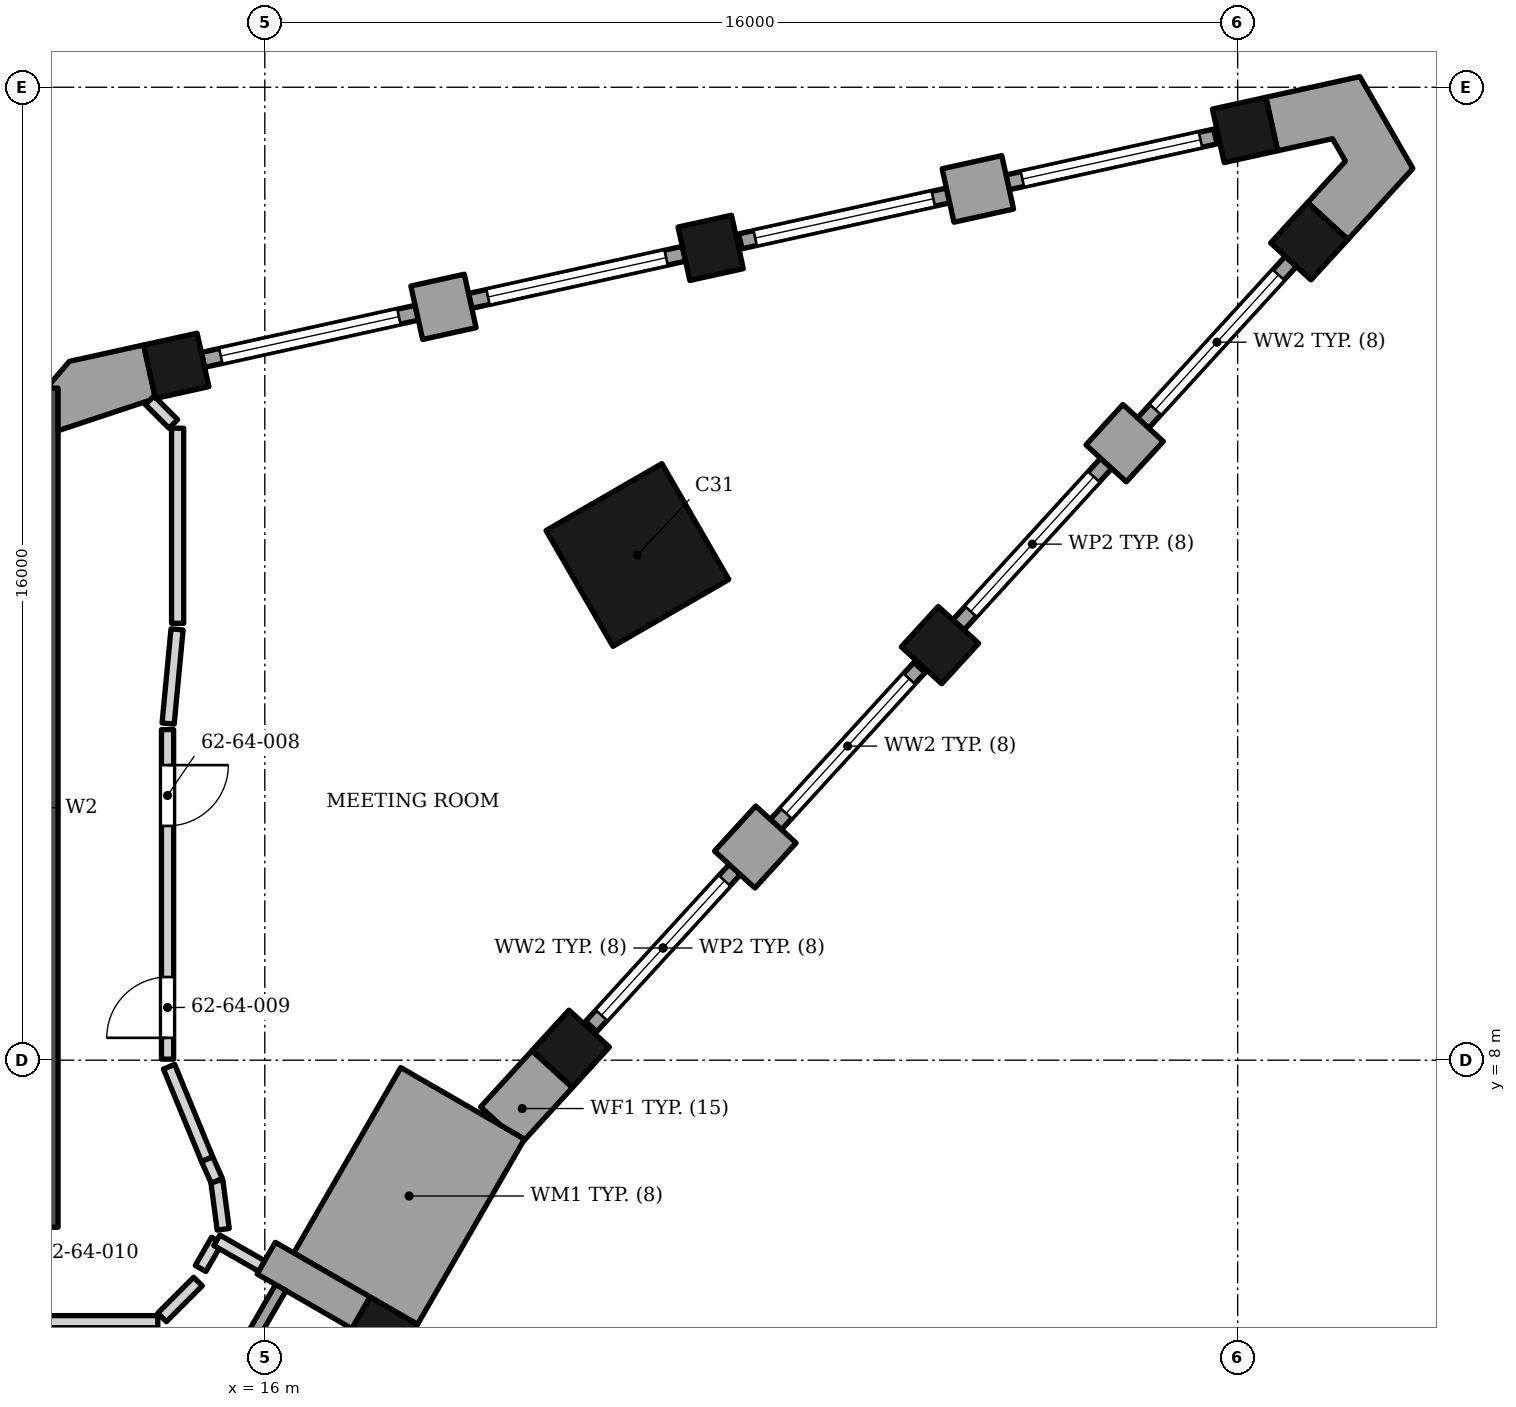
"""IFC4 building model, lengths in metres.
Left out: names, types, materials, properties, quantities, classifications, styles, units other than length and angle.
Written with IfcOpenShell. Run it as: python <this file> out.ifc"""

import sys

from ifc_helpers import new_model, si_unit, direction, frame, frame_2d, origin, origin_2d, place, context, subcontext, project, spatial, polyline, rectangle, outline, extrude, element, fill, save


model = new_model("IFC4")
c1 = context("Model", 3, precision=1e-05, world=origin(), true_north=direction((0.0, 1.0)))
c2 = subcontext(c1, "Body", "Model", "MODEL_VIEW")
j1 = project(units=[si_unit("LENGTHUNIT", "METRE"), si_unit("PLANEANGLEUNIT", "RADIAN")], contexts=[c1])
p1 = place(None, origin())
s1 = spatial("IfcSite", under=j1, at=p1, CompositionType="ELEMENT")
p2 = place(p1, origin())
s2 = spatial("IfcBuilding", under=s1, at=p2, CompositionType="ELEMENT")
p3 = place(p2, frame((0.0, 0.0, 259.9)))
s3 = spatial("IfcBuildingStorey", under=s2, at=p3, CompositionType="ELEMENT", Elevation=259.9)
p4 = place(p3, frame((12.35, 5.253, 0.0), z_axis=(0.0, 0.0, 1.0), x_axis=(0.0, 1.0, 0.0)))
e1 = element("IfcWall", 1, at=p4, inside=s3, PredefinedType="SHEAR", context=c2, shape_type="SweptSolid", body=[
    extrude(rectangle(XDim=13.8, YDim=0.5, at=frame_2d((6.9, 0.0))), origin(), (0.0, 0.0, 1.0), 3.9),
])
p5 = place(p3, frame((22.128, 16.308, 0.0), z_axis=(0.0, 0.0, 1.0), x_axis=(-0.866025421238, -0.49999996977, 0.0)))
e2 = element("IfcColumn", 2, at=p5, inside=s3, PredefinedType="COLUMN", context=c2, shape_type="SweptSolid", body=[
    extrude(rectangle(XDim=2.2, YDim=2.2, at=origin_2d()), origin(), (0.0, 0.0, 1.0), 3.9),
])
for number, where, z_axis, x_axis in (
    (3, (17.896, 3.49, 0.0), (0.0, 0.0, 1.0), (0.5, 0.866, 0.0)),
    (4, (21.031, 8.187, 0.0), (0.0, 0.0, 1.0), (0.675, 0.738, 0.0)),
    (5, (27.104, 14.826, 0.0), (0.0, 0.0, 1.0), (0.675, 0.738, 0.0)),
    (6, (33.178, 21.468, 0.0), (0.0, 0.0, 1.0), (0.675, 0.738, 0.0)),
    (7, (32.121, 23.298, 0.0), (0.0, 0.0, 1.0), (-0.977, -0.215, 0.0)),
    (8, (23.333, 21.359, 0.0), (0.0, 0.0, 1.0), (-0.977, -0.215, 0.0)),
    (9, (14.544, 19.419, 0.0), (0.0, 0.0, 1.0), (-0.977, -0.215, 0.0)),
):
    element("IfcColumn", number, at=place(p3, frame(where, z_axis=z_axis, x_axis=x_axis)), inside=s3, PredefinedType="COLUMN", context=c2, shape_type="SweptSolid", body=[
        extrude(rectangle(XDim=0.9, YDim=0.9, at=origin_2d()), origin(), (0.0, 0.0, 1.0), 3.9),
    ])
p6 = place(p3, frame((16.023, 4.745, 0.0), z_axis=(0.0, 0.0, 1.0), x_axis=(0.865989075817, -0.500062916607, 0.0)))
e10 = element("IfcWall", 10, at=p6, inside=s3, PredefinedType="SOLIDWALL", context=c2, shape_type="SweptSolid", body=[
    extrude(rectangle(XDim=1.8, YDim=0.6, at=frame_2d((0.9, 0.0))), origin(), (0.0, 0.0, 1.0), 2.95),
])
p7 = place(p3, frame((14.163, 0.623, 0.0), z_axis=(0.0, 0.0, 1.0), x_axis=(0.500002543286, 0.866023935413, 0.0)))
e11 = element("IfcWall", 11, at=p7, inside=s3, PredefinedType="ELEMENTEDWALL", context=c2, shape_type="SweptSolid", body=[
    extrude(rectangle(XDim=4.2, YDim=0.2, at=frame_2d((2.1, 0.0))), origin(), (0.0, 0.0, 1.0), 2.95),
])
p8 = place(p3, origin())
e12 = element("IfcWall", 12, at=p8, inside=s3, PredefinedType="SOLIDWALL", context=c2, shape_type="SweptSolid", body=[
    extrude(outline(polyline([(18.236, 7.878), (16.476, 4.83), (18.511, 3.655), (20.271, 6.703), (18.236, 7.878)])), origin(), (0.0, 0.0, 1.0), 2.974),
])
p9 = place(p3, frame((23.729, 11.135, 0.0), z_axis=(0.0, 0.0, 1.0), x_axis=(0.674788120713, 0.738011512203, 0.0)))
e13 = element("IfcWall", 13, at=p9, inside=s3, PredefinedType="SOLIDWALL", context=c2, shape_type="SweptSolid", body=[
    extrude(rectangle(XDim=1.004, YDim=0.9, at=frame_2d((0.502, 0.0))), origin(), (0.0, 0.0, 1.0), 3.0),
])
p10 = place(p3, frame((30.445, 18.479, 0.0), z_axis=(0.0, 0.0, 1.0), x_axis=(-0.674938051731, -0.737874397391, 0.0)))
e14 = element("IfcWall", 14, at=p10, inside=s3, PredefinedType="SOLIDWALL", context=c2, shape_type="SweptSolid", body=[
    extrude(rectangle(XDim=0.9, YDim=0.9, at=frame_2d((0.45, 0.0))), origin(), (0.0, 0.0, 1.0), 3.0),
])
p11 = place(p3, frame((21.368, 8.554, 0.0), z_axis=(0.0, 0.0, 1.0), x_axis=(0.67487449122, 0.737932531537, 0.0)))
e15 = element("IfcWall", 15, at=p11, inside=s3, PredefinedType="ELEMENTEDWALL", context=c2, shape_type="SweptSolid", body=[
    extrude(rectangle(XDim=3.5, YDim=0.25, at=frame_2d((1.75, 0.0))), origin(), (0.0, 0.0, 1.0), 3.0),
])
p12 = place(p11, frame((0.25, 0.0, 0.3)))
e16 = element("IfcOpeningElement", 16, at=p12, cuts=e15, PredefinedType="OPENING", context=c2, shape_type="SweptSolid", body=[
    extrude(rectangle(XDim=3.0, YDim=2.5, at=frame_2d((1.5, 1.25))), frame((0.0, 0.135, 0.0), z_axis=(0.0, -1.0, 0.0), x_axis=(1.0, 0.0, 0.0)), (0.0, 0.0, 1.0), 0.27),
])
p13 = place(p3, frame((24.405, 11.875, 0.0), z_axis=(0.0, 0.0, 1.0), x_axis=(0.67487449122, 0.737932531537, 0.0)))
e17 = element("IfcWall", 17, at=p13, inside=s3, PredefinedType="ELEMENTEDWALL", context=c2, shape_type="SweptSolid", body=[
    extrude(rectangle(XDim=3.5, YDim=0.25, at=frame_2d((1.75, 0.0))), origin(), (0.0, 0.0, 1.0), 3.0),
])
p14 = place(p13, frame((0.25, 0.0, 0.3)))
e18 = element("IfcOpeningElement", 18, at=p14, cuts=e17, PredefinedType="OPENING", context=c2, shape_type="SweptSolid", body=[
    extrude(rectangle(XDim=3.0, YDim=2.5, at=frame_2d((1.5, 1.25))), frame((0.0, 0.135, 0.0), z_axis=(0.0, -1.0, 0.0), x_axis=(1.0, 0.0, 0.0)), (0.0, 0.0, 1.0), 0.27),
])
p15 = place(p3, frame((27.408, 15.158, 0.0), z_axis=(0.0, 0.0, 1.0), x_axis=(0.674833575111, 0.737969949187, 0.0)))
e19 = element("IfcWall", 19, at=p15, inside=s3, PredefinedType="ELEMENTEDWALL", context=c2, shape_type="SweptSolid", body=[
    extrude(rectangle(XDim=3.6, YDim=0.25, at=frame_2d((1.8, 0.0))), origin(), (0.0, 0.0, 1.0), 3.0),
])
p16 = place(p15, frame((0.3, 0.0, 0.3)))
e20 = element("IfcOpeningElement", 20, at=p16, cuts=e19, PredefinedType="OPENING", context=c2, shape_type="SweptSolid", body=[
    extrude(rectangle(XDim=3.0, YDim=2.5, at=frame_2d((1.5, 1.25))), frame((0.0, 0.135, 0.0), z_axis=(0.0, -1.0, 0.0), x_axis=(1.0, 0.0, 0.0)), (0.0, 0.0, 1.0), 0.27),
])
p17 = place(p3, frame((30.445, 18.479, 0.0), z_axis=(0.0, 0.0, 1.0), x_axis=(0.674833575111, 0.737969949187, 0.0)))
e21 = element("IfcWall", 21, at=p17, inside=s3, PredefinedType="ELEMENTEDWALL", context=c2, shape_type="SweptSolid", body=[
    extrude(rectangle(XDim=3.6, YDim=0.25, at=frame_2d((1.8, 0.0))), origin(), (0.0, 0.0, 1.0), 3.0),
])
p18 = place(p17, frame((0.3, 0.0, 0.3)))
e22 = element("IfcOpeningElement", 22, at=p18, cuts=e21, PredefinedType="OPENING", context=c2, shape_type="SweptSolid", body=[
    extrude(rectangle(XDim=3.0, YDim=2.5, at=frame_2d((1.5, 1.25))), frame((0.0, 0.135, 0.0), z_axis=(0.0, -1.0, 0.0), x_axis=(1.0, 0.0, 0.0)), (0.0, 0.0, 1.0), 0.27),
])
p19 = place(p3, frame((28.217, 22.436, 0.0), z_axis=(0.0, 0.0, 1.0), x_axis=(-0.97656888558, -0.215205045752, 0.0)))
e23 = element("IfcWall", 23, at=p19, inside=s3, PredefinedType="SOLIDWALL", context=c2, shape_type="SweptSolid", body=[
    extrude(rectangle(XDim=1.004, YDim=0.9, at=frame_2d((0.502, 0.0))), origin(), (0.0, 0.0, 1.0), 3.0),
])
p20 = place(p3, frame((18.499, 20.292, 0.0), z_axis=(0.0, 0.0, 1.0), x_axis=(0.976473402733, 0.215637876437, 0.0)))
e24 = element("IfcWall", 24, at=p20, inside=s3, PredefinedType="SOLIDWALL", context=c2, shape_type="SweptSolid", body=[
    extrude(rectangle(XDim=0.9, YDim=0.9, at=frame_2d((0.45, 0.0))), origin(), (0.0, 0.0, 1.0), 3.0),
])
p21 = place(p3, frame((31.633, 23.19, 0.0), z_axis=(0.0, 0.0, 1.0), x_axis=(-0.976509313763, -0.215475196101, 0.0)))
e25 = element("IfcWall", 25, at=p21, inside=s3, PredefinedType="ELEMENTEDWALL", context=c2, shape_type="SweptSolid", body=[
    extrude(rectangle(XDim=3.5, YDim=0.25, at=frame_2d((1.75, 0.0))), origin(), (0.0, 0.0, 1.0), 3.0),
])
p22 = place(p21, frame((0.25, 0.0, 0.3)))
e26 = element("IfcOpeningElement", 26, at=p22, cuts=e25, PredefinedType="OPENING", context=c2, shape_type="SweptSolid", body=[
    extrude(rectangle(XDim=3.0, YDim=2.5, at=frame_2d((1.5, 1.25))), frame((0.0, 0.135, 0.0), z_axis=(0.0, -1.0, 0.0), x_axis=(1.0, 0.0, 0.0)), (0.0, 0.0, 1.0), 0.27),
])
p23 = place(p3, frame((27.239, 22.22, 0.0), z_axis=(0.0, 0.0, 1.0), x_axis=(-0.976509313763, -0.215475196101, 0.0)))
e27 = element("IfcWall", 27, at=p23, inside=s3, PredefinedType="ELEMENTEDWALL", context=c2, shape_type="SweptSolid", body=[
    extrude(rectangle(XDim=3.5, YDim=0.25, at=frame_2d((1.75, 0.0))), origin(), (0.0, 0.0, 1.0), 3.0),
])
p24 = place(p23, frame((0.25, 0.0, 0.3)))
e28 = element("IfcOpeningElement", 28, at=p24, cuts=e27, PredefinedType="OPENING", context=c2, shape_type="SweptSolid", body=[
    extrude(rectangle(XDim=3.0, YDim=2.5, at=frame_2d((1.5, 1.25))), frame((0.0, 0.135, 0.0), z_axis=(0.0, -1.0, 0.0), x_axis=(1.0, 0.0, 0.0)), (0.0, 0.0, 1.0), 0.27),
])
p25 = place(p3, frame((22.893, 21.262, 0.0), z_axis=(0.0, 0.0, 1.0), x_axis=(-0.976513072969, -0.215458159096, 0.0)))
e29 = element("IfcWall", 29, at=p25, inside=s3, PredefinedType="ELEMENTEDWALL", context=c2, shape_type="SweptSolid", body=[
    extrude(rectangle(XDim=3.6, YDim=0.25, at=frame_2d((1.8, 0.0))), origin(), (0.0, 0.0, 1.0), 3.0),
])
p26 = place(p25, frame((0.3, 0.0, 0.3)))
e30 = element("IfcOpeningElement", 30, at=p26, cuts=e29, PredefinedType="OPENING", context=c2, shape_type="SweptSolid", body=[
    extrude(rectangle(XDim=3.0, YDim=2.5, at=frame_2d((1.5, 1.25))), frame((0.0, 0.135, 0.0), z_axis=(0.0, -1.0, 0.0), x_axis=(1.0, 0.0, 0.0)), (0.0, 0.0, 1.0), 0.27),
])
p27 = place(p3, frame((18.499, 20.292, 0.0), z_axis=(0.0, 0.0, 1.0), x_axis=(-0.976513072969, -0.215458159096, 0.0)))
e31 = element("IfcWall", 31, at=p27, inside=s3, PredefinedType="ELEMENTEDWALL", context=c2, shape_type="SweptSolid", body=[
    extrude(rectangle(XDim=3.6, YDim=0.25, at=frame_2d((1.8, 0.0))), origin(), (0.0, 0.0, 1.0), 3.0),
])
p28 = place(p27, frame((0.3, 0.0, 0.3)))
e32 = element("IfcOpeningElement", 32, at=p28, cuts=e31, PredefinedType="OPENING", context=c2, shape_type="SweptSolid", body=[
    extrude(rectangle(XDim=3.0, YDim=2.5, at=frame_2d((1.5, 1.25))), frame((0.0, 0.135, 0.0), z_axis=(0.0, -1.0, 0.0), x_axis=(1.0, 0.0, 0.0)), (0.0, 0.0, 1.0), 0.27),
])
p29 = place(p3, origin())
e33 = element("IfcWall", 33, at=p29, inside=s3, PredefinedType="SOLIDWALL", context=c2, shape_type="SweptSolid", body=[
    extrude(outline(polyline([(20.395, 8.156), (19.549, 7.232), (19.881, 6.928), (20.271, 6.703), (20.247, 6.661), (21.059, 7.549), (20.395, 8.156)])), origin(), (0.0, 0.0, 1.0), 3.0),
])
p30 = place(p3, origin())
e34 = element("IfcWall", 34, at=p30, inside=s3, PredefinedType="SOLIDWALL", context=c2, shape_type="SweptSolid", body=[
    extrude(outline(polyline([(33.814, 21.496), (34.882, 22.664), (34.009, 24.175), (32.464, 23.834), (32.658, 22.955), (33.559, 23.154), (33.772, 22.785), (33.15, 22.104), (33.814, 21.496)])), origin(), (0.0, 0.0, 1.0), 3.0),
])
p31 = place(p3, origin())
e35 = element("IfcWall", 35, at=p31, inside=s3, PredefinedType="SOLIDWALL", context=c2, shape_type="SweptSolid", body=[
    extrude(outline(polyline([(14.201, 18.883), (14.008, 19.762), (12.784, 19.492), (12.41, 19.052), (12.6, 19.052), (12.6, 18.352), (14.201, 18.883)])), origin(), (0.0, 0.0, 1.0), 3.0),
])
p32 = place(p3, frame((8.632, 3.645, 0.0), z_axis=(0.0, 0.0, 1.0), x_axis=(0.865909656502, -0.500200426606, 0.0)))
e36 = element("IfcWall", 36, at=p32, inside=s3, PredefinedType="PARTITIONING", context=c2, shape_type="SweptSolid", body=[
    extrude(rectangle(XDim=5.851, YDim=0.2, at=frame_2d((2.925, 0.0))), origin(), (0.0, 0.0, 1.0), 3.052),
])
p33 = place(p3, frame((8.726, 3.699, 0.0), z_axis=(0.0, 0.0, 1.0), x_axis=(1.0, 0.0, 0.0)))
e37 = element("IfcWall", 37, at=p33, inside=s3, PredefinedType="PARTITIONING", context=c2, shape_type="SweptSolid", body=[
    extrude(rectangle(XDim=5.514, YDim=0.2, at=frame_2d((2.757, 0.0))), origin(), (0.0, 0.0, 1.0), 3.282),
])
p34 = place(p33, frame((1.857, 0.0, 0.0)))
e38 = element("IfcOpeningElement", 38, at=p34, cuts=e37, PredefinedType="OPENING", context=c2, shape_type="SweptSolid", body=[
    extrude(rectangle(XDim=1.8, YDim=2.4, at=frame_2d((0.9, 1.2))), frame((0.0, 0.11, 0.0), z_axis=(0.0, -1.0, 0.0), x_axis=(1.0, 0.0, 0.0)), (0.0, 0.0, 1.0), 0.22),
])
p35 = place(p3, frame((14.311, 3.77, 0.0), z_axis=(0.0, 0.0, 1.0), x_axis=(0.707253195258, 0.706960336792, 0.0)))
e39 = element("IfcWall", 39, at=p35, inside=s3, PredefinedType="PARTITIONING", context=c2, shape_type="SweptSolid", body=[
    extrude(rectangle(XDim=0.834, YDim=0.2, at=frame_2d((0.417, 0.0))), origin(), (0.0, 0.0, 1.0), 3.73),
])
p36 = place(p3, frame((14.944, 4.575, 0.0), z_axis=(0.0, 0.0, 1.0), x_axis=(0.500209224752, 0.865904574115, 0.0)))
e40 = element("IfcWall", 40, at=p36, inside=s3, PredefinedType="PARTITIONING", context=c2, shape_type="SweptSolid", body=[
    extrude(rectangle(XDim=0.535, YDim=0.2, at=frame_2d((0.268, 0.0))), origin(), (0.0, 0.0, 1.0), 2.95),
])
p37 = place(p3, frame((15.211, 5.038, 0.0), z_axis=(0.0, 0.0, 1.0), x_axis=(0.867126672162, -0.498087677447, 0.0)))
e41 = element("IfcWall", 41, at=p37, inside=s3, PredefinedType="PARTITIONING", context=c2, shape_type="SweptSolid", body=[
    extrude(rectangle(XDim=0.849, YDim=0.2, at=frame_2d((0.425, 0.0))), origin(), (0.0, 0.0, 1.0), 2.95),
])
p38 = place(p3, frame((15.211, 6.016, 0.0), z_axis=(0.0, 0.0, 1.0), x_axis=(0.130572336197, -0.991438785312, 0.0)))
e42 = element("IfcWall", 42, at=p38, inside=s3, PredefinedType="PARTITIONING", context=c2, shape_type="SweptSolid", body=[
    extrude(rectangle(XDim=0.804, YDim=0.2, at=frame_2d((0.402, 0.0))), origin(), (0.0, 0.0, 1.0), 3.73),
])
p39 = place(p3, frame((15.051, 6.374, 0.0), z_axis=(0.0, 0.0, 1.0), x_axis=(0.408161090952, -0.912909920985, 0.0)))
e43 = element("IfcWall", 43, at=p39, inside=s3, PredefinedType="PARTITIONING", context=c2, shape_type="SweptSolid", body=[
    extrude(rectangle(XDim=0.392, YDim=0.2, at=frame_2d((0.196, 0.0))), origin(), (0.0, 0.0, 1.0), 3.73),
])
p40 = place(p3, frame((14.425, 7.893, 0.0), z_axis=(0.0, 0.0, 1.0), x_axis=(0.380824536343, -0.924647323318, 0.0)))
e44 = element("IfcWall", 44, at=p40, inside=s3, PredefinedType="PARTITIONING", context=c2, shape_type="SweptSolid", body=[
    extrude(rectangle(XDim=1.643, YDim=0.2, at=frame_2d((0.822, 0.0))), origin(), (0.0, 0.0, 1.0), 3.73),
])
p41 = place(p3, frame((14.4, 8.017, 0.0), z_axis=(0.0, 0.0, 1.0), x_axis=(0.0, 1.0, 0.0)))
e45 = element("IfcWall", 45, at=p41, inside=s3, PredefinedType="PARTITIONING", context=c2, shape_type="SweptSolid", body=[
    extrude(rectangle(XDim=5.419, YDim=0.2, at=frame_2d((2.709, 0.0))), origin(), (0.0, 0.0, 1.0), 3.73),
])
p42 = place(p41, frame((3.835, 0.0, 0.0)))
e46 = element("IfcOpeningElement", 46, at=p42, cuts=e45, PredefinedType="OPENING", context=c2, shape_type="SweptSolid", body=[
    extrude(rectangle(XDim=1.0, YDim=2.1, at=frame_2d((0.5, 1.05))), frame((0.0, 0.11, 0.0), z_axis=(0.0, -1.0, 0.0), x_axis=(1.0, 0.0, 0.0)), (0.0, 0.0, 1.0), 0.22),
])
p43 = place(p41, frame((0.35, 0.0, 0.0)))
e47 = element("IfcOpeningElement", 47, at=p43, cuts=e45, PredefinedType="OPENING", context=c2, shape_type="SweptSolid", body=[
    extrude(rectangle(XDim=1.0, YDim=2.1, at=frame_2d((0.5, 1.05))), frame((0.0, 0.11, 0.0), z_axis=(0.0, -1.0, 0.0), x_axis=(1.0, 0.0, 0.0)), (0.0, 0.0, 1.0), 0.22),
])
p44 = place(p3, frame((14.41, 13.536, 0.0), z_axis=(0.0, 0.0, 1.0), x_axis=(0.094453682086, 0.9955292572, 0.0)))
e48 = element("IfcWall", 48, at=p44, inside=s3, PredefinedType="PARTITIONING", context=c2, shape_type="SweptSolid", body=[
    extrude(rectangle(XDim=1.556, YDim=0.2, at=frame_2d((0.778, 0.0))), origin(), (0.0, 0.0, 1.0), 3.73),
])
p45 = place(p3, frame((14.566, 18.393, 0.0), z_axis=(0.0, 0.0, 1.0), x_axis=(0.0, -1.0, 0.0)))
e49 = element("IfcWall", 49, at=p45, inside=s3, PredefinedType="PARTITIONING", context=c2, shape_type="SweptSolid", body=[
    extrude(rectangle(XDim=3.208, YDim=0.2, at=frame_2d((1.604, 0.0))), origin(), (0.0, 0.0, 1.0), 3.73),
])
p46 = place(p3, frame((14.107, 18.852, 0.0), z_axis=(0.0, 0.0, 1.0), x_axis=(0.707106781187, -0.707106781187, 0.0)))
e50 = element("IfcWall", 50, at=p46, inside=s3, PredefinedType="PARTITIONING", context=c2, shape_type="SweptSolid", body=[
    extrude(rectangle(XDim=0.549, YDim=0.2, at=frame_2d((0.275, 0.0))), origin(), (0.0, 0.0, 1.0), 3.73),
])
p47 = place(p12, origin())
e51 = element("IfcWindow", 51, at=p47, inside=s3, PartitioningType="SINGLE_PANEL", PredefinedType="WINDOW", context=c2, shape_type="SweptSolid", body=[
    extrude(rectangle(XDim=3.0, YDim=2.5, at=frame_2d((1.5, 1.25))), frame((0.0, 0.03, 0.0), z_axis=(0.0, -1.0, 0.0), x_axis=(1.0, 0.0, 0.0)), (0.0, 0.0, 1.0), 0.06),
])
fill(e16, e51)
p48 = place(p14, origin())
e52 = element("IfcWindow", 52, at=p48, inside=s3, PartitioningType="SINGLE_PANEL", PredefinedType="WINDOW", context=c2, shape_type="SweptSolid", body=[
    extrude(rectangle(XDim=3.0, YDim=2.5, at=frame_2d((1.5, 1.25))), frame((0.0, 0.03, 0.0), z_axis=(0.0, -1.0, 0.0), x_axis=(1.0, 0.0, 0.0)), (0.0, 0.0, 1.0), 0.06),
])
fill(e18, e52)
p49 = place(p16, origin())
e53 = element("IfcWindow", 53, at=p49, inside=s3, PartitioningType="SINGLE_PANEL", PredefinedType="WINDOW", context=c2, shape_type="SweptSolid", body=[
    extrude(rectangle(XDim=3.0, YDim=2.5, at=frame_2d((1.5, 1.25))), frame((0.0, 0.03, 0.0), z_axis=(0.0, -1.0, 0.0), x_axis=(1.0, 0.0, 0.0)), (0.0, 0.0, 1.0), 0.06),
])
fill(e20, e53)
p50 = place(p18, origin())
e54 = element("IfcWindow", 54, at=p50, inside=s3, PartitioningType="SINGLE_PANEL", PredefinedType="WINDOW", context=c2, shape_type="SweptSolid", body=[
    extrude(rectangle(XDim=3.0, YDim=2.5, at=frame_2d((1.5, 1.25))), frame((0.0, 0.03, 0.0), z_axis=(0.0, -1.0, 0.0), x_axis=(1.0, 0.0, 0.0)), (0.0, 0.0, 1.0), 0.06),
])
fill(e22, e54)
p51 = place(p22, origin())
e55 = element("IfcWindow", 55, at=p51, inside=s3, PartitioningType="SINGLE_PANEL", PredefinedType="WINDOW", context=c2, shape_type="SweptSolid", body=[
    extrude(rectangle(XDim=3.0, YDim=2.5, at=frame_2d((1.5, 1.25))), frame((0.0, 0.03, 0.0), z_axis=(0.0, -1.0, 0.0), x_axis=(1.0, 0.0, 0.0)), (0.0, 0.0, 1.0), 0.06),
])
fill(e26, e55)
p52 = place(p24, origin())
e56 = element("IfcWindow", 56, at=p52, inside=s3, PartitioningType="SINGLE_PANEL", PredefinedType="WINDOW", context=c2, shape_type="SweptSolid", body=[
    extrude(rectangle(XDim=3.0, YDim=2.5, at=frame_2d((1.5, 1.25))), frame((0.0, 0.03, 0.0), z_axis=(0.0, -1.0, 0.0), x_axis=(1.0, 0.0, 0.0)), (0.0, 0.0, 1.0), 0.06),
])
fill(e28, e56)
p53 = place(p26, origin())
e57 = element("IfcWindow", 57, at=p53, inside=s3, PartitioningType="SINGLE_PANEL", PredefinedType="WINDOW", context=c2, shape_type="SweptSolid", body=[
    extrude(rectangle(XDim=3.0, YDim=2.5, at=frame_2d((1.5, 1.25))), frame((0.0, 0.03, 0.0), z_axis=(0.0, -1.0, 0.0), x_axis=(1.0, 0.0, 0.0)), (0.0, 0.0, 1.0), 0.06),
])
fill(e30, e57)
p54 = place(p28, origin())
e58 = element("IfcWindow", 58, at=p54, inside=s3, PartitioningType="SINGLE_PANEL", PredefinedType="WINDOW", context=c2, shape_type="SweptSolid", body=[
    extrude(rectangle(XDim=3.0, YDim=2.5, at=frame_2d((1.5, 1.25))), frame((0.0, 0.03, 0.0), z_axis=(0.0, -1.0, 0.0), x_axis=(1.0, 0.0, 0.0)), (0.0, 0.0, 1.0), 0.06),
])
fill(e32, e58)
p55 = place(p42, origin())
e59 = element("IfcDoor", 59, at=p55, inside=s3, OperationType="SINGLE_SWING_RIGHT", PredefinedType="DOOR", context=c2, shape_type="SweptSolid", body=[
    extrude(rectangle(XDim=1.0, YDim=2.1, at=frame_2d((0.5, 1.05))), frame((0.0, 0.025, 0.0), z_axis=(0.0, -1.0, 0.0), x_axis=(1.0, 0.0, 0.0)), (0.0, 0.0, 1.0), 0.05),
])
fill(e46, e59)
p56 = place(p43, origin())
e60 = element("IfcDoor", 60, at=p56, inside=s3, OperationType="SINGLE_SWING_LEFT", PredefinedType="DOOR", context=c2, shape_type="SweptSolid", body=[
    extrude(rectangle(XDim=1.0, YDim=2.1, at=frame_2d((0.5, 1.05))), frame((0.0, 0.025, 0.0), z_axis=(0.0, -1.0, 0.0), x_axis=(1.0, 0.0, 0.0)), (0.0, 0.0, 1.0), 0.05),
])
fill(e47, e60)
save(model, sys.argv[1])
